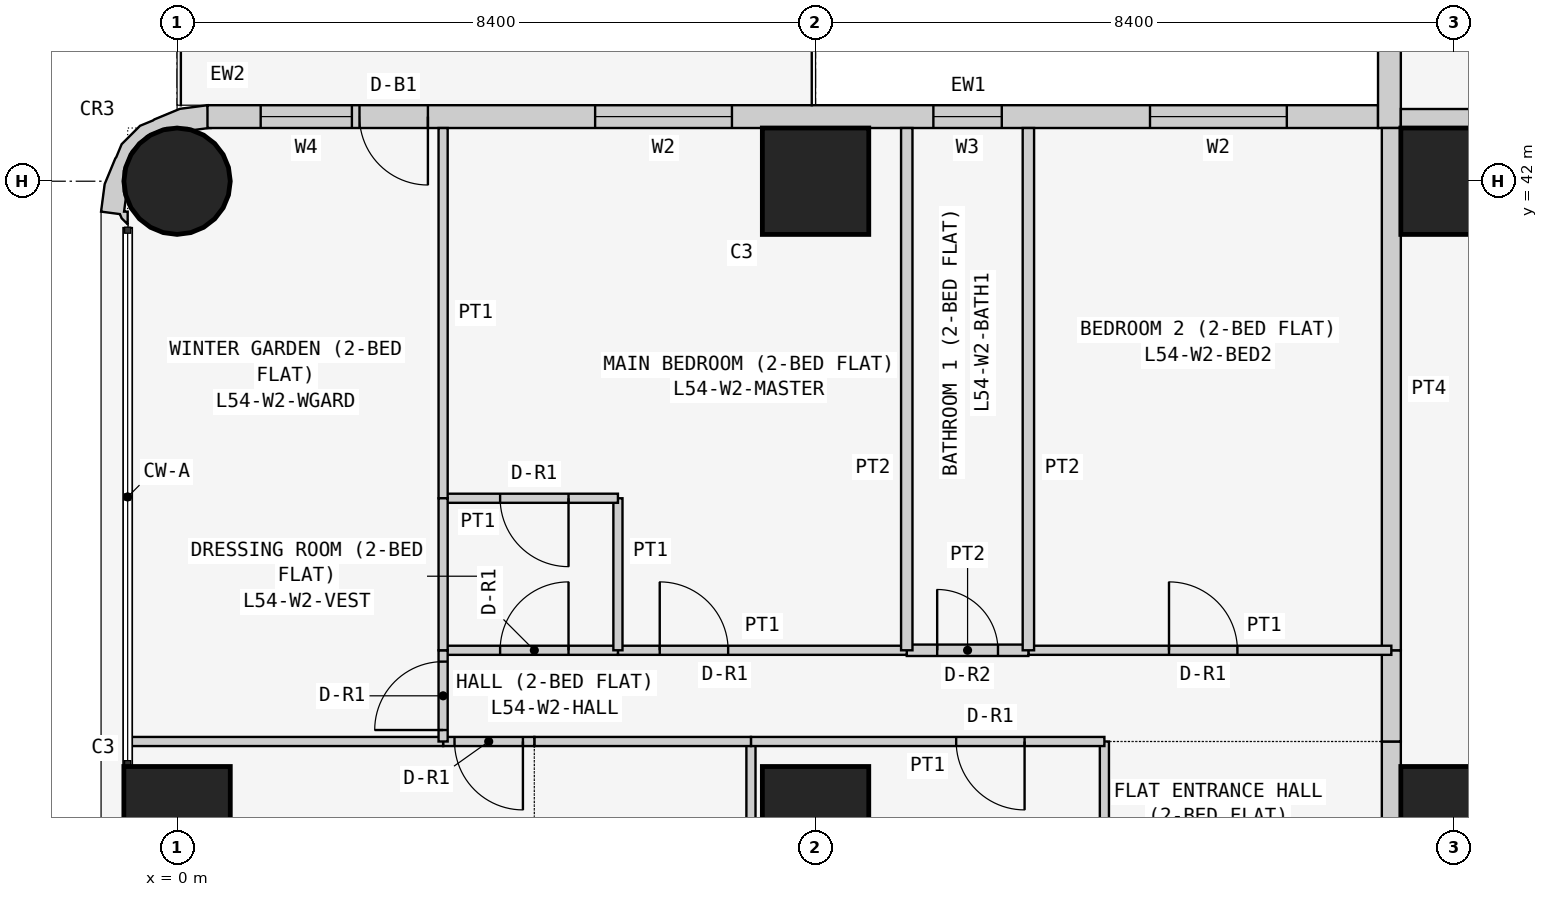
"""IFC4 building model, lengths in metres.
Left out: names, types, materials, properties, quantities, classifications, styles, units other than length and angle.
Written with IfcOpenShell. Run it as: python <this file> out.ifc"""

import sys

from ifc_helpers import new_model, si_unit, direction, frame, frame_2d, origin, origin_2d, place, context, subcontext, project, spatial, polyline, rectangle, circle, outline, extrude, element, fill, save


model = new_model("IFC4")
c1 = context("Model", 3, precision=1e-05, world=origin(), true_north=direction((0.0, 1.0)))
c2 = subcontext(c1, "Body", "Model", "MODEL_VIEW")
j1 = project(units=[si_unit("LENGTHUNIT", "METRE"), si_unit("PLANEANGLEUNIT", "RADIAN")], contexts=[c1])
p1 = place(None, origin())
s1 = spatial("IfcSite", under=j1, at=p1, CompositionType="ELEMENT")
p2 = place(p1, origin())
s2 = spatial("IfcBuilding", under=s1, at=p2, CompositionType="ELEMENT")
p3 = place(p2, frame((0.0, 0.0, 208.5)))
s3 = spatial("IfcBuildingStorey", under=s2, at=p3, CompositionType="ELEMENT", Elevation=208.5)
p4 = place(p3, frame((0.0, 33.6, 0.0), z_axis=(0.0, 0.0, 1.0), x_axis=(1.0, 0.0, 0.0)))
e1 = element("IfcColumn", 1, at=p4, inside=s3, PredefinedType="COLUMN", context=c2, shape_type="SweptSolid", body=[
    extrude(rectangle(XDim=1.4, YDim=1.4, at=origin_2d()), origin(), (0.0, 0.0, 1.0), 3.6),
])
p5 = place(p3, frame((0.0, 42.0, 0.0), z_axis=(0.0, 0.0, 1.0), x_axis=(1.0, 0.0, 0.0)))
e2 = element("IfcColumn", 2, at=p5, inside=s3, PredefinedType="COLUMN", context=c2, shape_type="SweptSolid", body=[
    extrude(circle(Radius=0.7, at=origin_2d()), origin(), (0.0, 0.0, 1.0), 3.6),
])
for number, where, z_axis, x_axis in (
    (3, (8.4, 33.6, 0.0), (0.0, 0.0, 1.0), (1.0, 0.0, 0.0)),
    (4, (8.4, 42.0, 0.0), (0.0, 0.0, 1.0), (1.0, 0.0, 0.0)),
    (5, (16.8, 33.6, 0.0), (0.0, 0.0, 1.0), (1.0, 0.0, 0.0)),
    (6, (16.8, 42.0, 0.0), (0.0, 0.0, 1.0), (1.0, 0.0, 0.0)),
):
    element("IfcColumn", number, at=place(p3, frame(where, z_axis=z_axis, x_axis=x_axis)), inside=s3, PredefinedType="COLUMN", context=c2, shape_type="SweptSolid", body=[
        extrude(rectangle(XDim=1.4, YDim=1.4, at=origin_2d()), origin(), (0.0, 0.0, 1.0), 3.6),
    ])
p6 = place(p3, frame((15.8, 42.85, 0.0), z_axis=(0.0, 0.0, 1.0), x_axis=(-1.0, 0.0, 0.0)))
e7 = element("IfcWall", 7, at=p6, inside=s3, PredefinedType="SOLIDWALL", context=c2, shape_type="SweptSolid", body=[
    extrude(rectangle(XDim=15.4, YDim=0.3, at=frame_2d((7.7, 0.0))), origin(), (0.0, 0.0, 1.0), 3.45),
])
p7 = place(p6, frame((1.2, 0.0, 0.9)))
e8 = element("IfcOpeningElement", 8, at=p7, cuts=e7, PredefinedType="OPENING", context=c2, shape_type="SweptSolid", body=[
    extrude(rectangle(XDim=1.8, YDim=1.5, at=frame_2d((0.9, 0.75))), frame((0.0, 0.16, 0.0), z_axis=(0.0, -1.0, 0.0), x_axis=(1.0, 0.0, 0.0)), (0.0, 0.0, 1.0), 0.32),
])
p8 = place(p6, frame((4.95, 0.0, 1.5)))
e9 = element("IfcOpeningElement", 9, at=p8, cuts=e7, PredefinedType="OPENING", context=c2, shape_type="SweptSolid", body=[
    extrude(rectangle(XDim=0.9, YDim=0.7, at=frame_2d((0.45, 0.35))), frame((0.0, 0.16, 0.0), z_axis=(0.0, -1.0, 0.0), x_axis=(1.0, 0.0, 0.0)), (0.0, 0.0, 1.0), 0.32),
])
p9 = place(p6, frame((8.5, 0.0, 0.9)))
e10 = element("IfcOpeningElement", 10, at=p9, cuts=e7, PredefinedType="OPENING", context=c2, shape_type="SweptSolid", body=[
    extrude(rectangle(XDim=1.8, YDim=1.5, at=frame_2d((0.9, 0.75))), frame((0.0, 0.16, 0.0), z_axis=(0.0, -1.0, 0.0), x_axis=(1.0, 0.0, 0.0)), (0.0, 0.0, 1.0), 0.32),
])
p10 = place(p6, frame((12.5, 0.0, 0.0)))
e11 = element("IfcOpeningElement", 11, at=p10, cuts=e7, PredefinedType="OPENING", context=c2, shape_type="SweptSolid", body=[
    extrude(rectangle(XDim=0.9, YDim=2.4, at=frame_2d((0.45, 1.2))), frame((0.0, 0.16, 0.0), z_axis=(0.0, -1.0, 0.0), x_axis=(1.0, 0.0, 0.0)), (0.0, 0.0, 1.0), 0.32),
])
p11 = place(p6, frame((13.5, 0.0, 0.9)))
e12 = element("IfcOpeningElement", 12, at=p11, cuts=e7, PredefinedType="OPENING", context=c2, shape_type="SweptSolid", body=[
    extrude(rectangle(XDim=1.2, YDim=1.5, at=frame_2d((0.6, 0.75))), frame((0.0, 0.16, 0.0), z_axis=(0.0, -1.0, 0.0), x_axis=(1.0, 0.0, 0.0)), (0.0, 0.0, 1.0), 0.32),
])
p12 = place(p3, frame((15.95, 50.0, 0.0), z_axis=(0.0, 0.0, 1.0), x_axis=(0.0, -1.0, 0.0)))
e13 = element("IfcWall", 13, at=p12, inside=s3, PredefinedType="SOLIDWALL", context=c2, shape_type="SweptSolid", body=[
    extrude(rectangle(XDim=7.3, YDim=0.3, at=frame_2d((3.65, 0.0))), origin(), (0.0, 0.0, 1.0), 3.45),
])
p13 = place(p12, frame((3.1, 0.0, 0.9)))
e14 = element("IfcOpeningElement", 14, at=p13, cuts=e13, PredefinedType="OPENING", context=c2, shape_type="SweptSolid", body=[
    extrude(rectangle(XDim=2.4, YDim=1.5, at=frame_2d((1.2, 0.75))), frame((0.0, 0.16, 0.0), z_axis=(0.0, -1.0, 0.0), x_axis=(1.0, 0.0, 0.0)), (0.0, 0.0, 1.0), 0.32),
])
p14 = place(p12, frame((0.75, 0.0, 0.9)))
e15 = element("IfcOpeningElement", 15, at=p14, cuts=e13, PredefinedType="OPENING", context=c2, shape_type="SweptSolid", body=[
    extrude(rectangle(XDim=1.2, YDim=1.5, at=frame_2d((0.6, 0.75))), frame((0.0, 0.16, 0.0), z_axis=(0.0, -1.0, 0.0), x_axis=(1.0, 0.0, 0.0)), (0.0, 0.0, 1.0), 0.32),
])
p15 = place(p3, frame((0.29, 42.724, 0.0), z_axis=(0.0, 0.0, 1.0), x_axis=(-0.898030234854, 0.439933741929, 0.0)))
e16 = element("IfcWall", 16, at=p15, inside=s3, PredefinedType="SOLIDWALL", context=c2, shape_type="SweptSolid", body=[
    extrude(outline(polyline([(-0.145, -0.044), (0.022, -0.296), (0.327, -0.094), (0.568, 0.18), (0.578, 0.199), (0.7, 0.338), (0.811, 0.661), (0.799, 0.846), (0.803, 0.866), (0.78, 1.231), (0.664, 1.577), (0.426, 1.497), (0.382, 1.536), (0.276, 1.572), (0.349, 1.423), (0.392, 1.444), (0.453, 1.261), (0.51, 1.211), (0.632, 0.961), (0.65, 0.683), (0.56, 0.419), (0.375, 0.21), (0.125, 0.087), (0.05, 0.082), (-0.127, -0.035), (-0.145, -0.044)])), origin(), (0.0, 0.0, 1.0), 3.45),
])
p16 = place(p3, frame((16.1, 42.825, 0.0), z_axis=(0.0, 0.0, 1.0), x_axis=(1.0, 0.0, 0.0)))
e17 = element("IfcWall", 17, at=p16, inside=s3, PredefinedType="PARTITIONING", context=c2, shape_type="SweptSolid", body=[
    extrude(rectangle(XDim=6.871, YDim=0.25, at=frame_2d((3.436, 0.0))), origin(), (0.0, 0.0, 1.0), 3.45),
])
p17 = place(p3, frame((15.975, 29.4, 0.0), z_axis=(0.0, 0.0, 1.0), x_axis=(0.0, 1.0, 0.0)))
e18 = element("IfcWall", 18, at=p17, inside=s3, PredefinedType="PARTITIONING", context=c2, shape_type="SweptSolid", body=[
    extrude(rectangle(XDim=5.229, YDim=0.25, at=frame_2d((2.615, 0.0))), origin(), (0.0, 0.0, 1.0), 3.45),
])
p18 = place(p17, frame((2.1, 0.0, 0.0)))
e19 = element("IfcOpeningElement", 19, at=p18, cuts=e18, PredefinedType="OPENING", context=c2, shape_type="SweptSolid", body=[
    extrude(rectangle(XDim=1.0, YDim=2.1, at=frame_2d((0.5, 1.05))), frame((0.0, 0.135, 0.0), z_axis=(0.0, -1.0, 0.0), x_axis=(1.0, 0.0, 0.0)), (0.0, 0.0, 1.0), 0.27),
])
p19 = place(p3, frame((15.975, 34.629, 0.0), z_axis=(0.0, 0.0, 1.0), x_axis=(0.0, 1.0, 0.0)))
e20 = element("IfcWall", 20, at=p19, inside=s3, PredefinedType="PARTITIONING", context=c2, shape_type="SweptSolid", body=[
    extrude(rectangle(XDim=1.2, YDim=0.25, at=frame_2d((0.6, 0.0))), origin(), (0.0, 0.0, 1.0), 3.45),
])
p20 = place(p3, frame((15.975, 35.829, 0.0), z_axis=(0.0, 0.0, 1.0), x_axis=(0.0, 1.0, 0.0)))
e21 = element("IfcWall", 21, at=p20, inside=s3, PredefinedType="PARTITIONING", context=c2, shape_type="SweptSolid", body=[
    extrude(rectangle(XDim=6.871, YDim=0.25, at=frame_2d((3.436, 0.0))), origin(), (0.0, 0.0, 1.0), 3.45),
])
for number, where, z_axis, x_axis in (
    (22, (12.2, 29.4, 0.0), (0.0, 0.0, 1.0), (0.0, 1.0, 0.0)),
    (23, (7.55, 29.4, 0.0), (0.0, 0.0, 1.0), (0.0, 1.0, 0.0)),
):
    element("IfcWall", number, at=place(p3, frame(where, z_axis=z_axis, x_axis=x_axis)), inside=s3, PredefinedType="PARTITIONING", context=c2, shape_type="SweptSolid", body=[
        extrude(rectangle(XDim=5.229, YDim=0.12, at=frame_2d((2.615, 0.0))), origin(), (0.0, 0.0, 1.0), 3.45),
    ])
p21 = place(p3, frame((7.55, 34.629, 0.0), z_axis=(0.0, 0.0, 1.0), x_axis=(1.0, 0.0, 0.0)))
e24 = element("IfcWall", 24, at=p21, inside=s3, PredefinedType="PARTITIONING", context=c2, shape_type="SweptSolid", body=[
    extrude(rectangle(XDim=4.65, YDim=0.12, at=frame_2d((2.325, 0.0))), origin(), (0.0, 0.0, 1.0), 3.45),
])
p22 = place(p21, frame((2.7, 0.0, 0.0)))
e25 = element("IfcOpeningElement", 25, at=p22, cuts=e24, PredefinedType="OPENING", context=c2, shape_type="SweptSolid", body=[
    extrude(rectangle(XDim=0.9, YDim=2.1, at=frame_2d((0.45, 1.05))), frame((0.0, 0.07, 0.0), z_axis=(0.0, -1.0, 0.0), x_axis=(1.0, 0.0, 0.0)), (0.0, 0.0, 1.0), 0.14),
])
p23 = place(p3, frame((4.7, 34.629, 0.0), z_axis=(0.0, 0.0, 1.0), x_axis=(1.0, 0.0, 0.0)))
e26 = element("IfcWall", 26, at=p23, inside=s3, PredefinedType="PARTITIONING", context=c2, shape_type="SweptSolid", body=[
    extrude(rectangle(XDim=2.85, YDim=0.12, at=frame_2d((1.425, 0.0))), origin(), (0.0, 0.0, 1.0), 3.45),
])
p24 = place(p3, frame((3.5, 34.629, 0.0), z_axis=(0.0, 0.0, 1.0), x_axis=(1.0, 0.0, 0.0)))
e27 = element("IfcWall", 27, at=p24, inside=s3, PredefinedType="PARTITIONING", context=c2, shape_type="SweptSolid", body=[
    extrude(rectangle(XDim=1.2, YDim=0.12, at=frame_2d((0.6, 0.0))), origin(), (0.0, 0.0, 1.0), 3.45),
])
p25 = place(p24, frame((0.15, 0.0, 0.0)))
e28 = element("IfcOpeningElement", 28, at=p25, cuts=e27, PredefinedType="OPENING", context=c2, shape_type="SweptSolid", body=[
    extrude(rectangle(XDim=0.9, YDim=2.1, at=frame_2d((0.45, 1.05))), frame((0.0, 0.07, 0.0), z_axis=(0.0, -1.0, 0.0), x_axis=(1.0, 0.0, 0.0)), (0.0, 0.0, 1.0), 0.14),
])
p26 = place(p3, frame((-0.65, 34.629, 0.0), z_axis=(0.0, 0.0, 1.0), x_axis=(1.0, 0.0, 0.0)))
e29 = element("IfcWall", 29, at=p26, inside=s3, PredefinedType="PARTITIONING", context=c2, shape_type="SweptSolid", body=[
    extrude(rectangle(XDim=4.15, YDim=0.12, at=frame_2d((2.075, 0.0))), origin(), (0.0, 0.0, 1.0), 3.45),
])
p27 = place(p3, frame((11.2, 35.829, 0.0), z_axis=(0.0, 0.0, 1.0), x_axis=(1.0, 0.0, 0.0)))
e30 = element("IfcWall", 30, at=p27, inside=s3, PredefinedType="PARTITIONING", context=c2, shape_type="SweptSolid", body=[
    extrude(rectangle(XDim=4.775, YDim=0.12, at=frame_2d((2.388, 0.0))), origin(), (0.0, 0.0, 1.0), 3.45),
])
p28 = place(p27, frame((1.85, 0.0, 0.0)))
e31 = element("IfcOpeningElement", 31, at=p28, cuts=e30, PredefinedType="OPENING", context=c2, shape_type="SweptSolid", body=[
    extrude(rectangle(XDim=0.9, YDim=2.1, at=frame_2d((0.45, 1.05))), frame((0.0, 0.07, 0.0), z_axis=(0.0, -1.0, 0.0), x_axis=(1.0, 0.0, 0.0)), (0.0, 0.0, 1.0), 0.14),
])
p29 = place(p3, frame((9.6, 35.829, 0.0), z_axis=(0.0, 0.0, 1.0), x_axis=(1.0, 0.0, 0.0)))
e32 = element("IfcWall", 32, at=p29, inside=s3, PredefinedType="PARTITIONING", context=c2, shape_type="SweptSolid", body=[
    extrude(rectangle(XDim=1.6, YDim=0.15, at=frame_2d((0.8, 0.0))), origin(), (0.0, 0.0, 1.0), 3.45),
])
p30 = place(p29, frame((0.4, 0.0, 0.0)))
e33 = element("IfcOpeningElement", 33, at=p30, cuts=e32, PredefinedType="OPENING", context=c2, shape_type="SweptSolid", body=[
    extrude(rectangle(XDim=0.8, YDim=2.1, at=frame_2d((0.4, 1.05))), frame((0.0, 0.085, 0.0), z_axis=(0.0, -1.0, 0.0), x_axis=(1.0, 0.0, 0.0)), (0.0, 0.0, 1.0), 0.17),
])
p31 = place(p3, frame((5.8, 35.829, 0.0), z_axis=(0.0, 0.0, 1.0), x_axis=(1.0, 0.0, 0.0)))
e34 = element("IfcWall", 34, at=p31, inside=s3, PredefinedType="PARTITIONING", context=c2, shape_type="SweptSolid", body=[
    extrude(rectangle(XDim=3.8, YDim=0.12, at=frame_2d((1.9, 0.0))), origin(), (0.0, 0.0, 1.0), 3.45),
])
p32 = place(p31, frame((0.55, 0.0, 0.0)))
e35 = element("IfcOpeningElement", 35, at=p32, cuts=e34, PredefinedType="OPENING", context=c2, shape_type="SweptSolid", body=[
    extrude(rectangle(XDim=0.9, YDim=2.1, at=frame_2d((0.45, 1.05))), frame((0.0, 0.07, 0.0), z_axis=(0.0, -1.0, 0.0), x_axis=(1.0, 0.0, 0.0)), (0.0, 0.0, 1.0), 0.14),
])
p33 = place(p3, frame((3.5, 35.829, 0.0), z_axis=(0.0, 0.0, 1.0), x_axis=(1.0, 0.0, 0.0)))
e36 = element("IfcWall", 36, at=p33, inside=s3, PredefinedType="PARTITIONING", context=c2, shape_type="SweptSolid", body=[
    extrude(rectangle(XDim=2.3, YDim=0.12, at=frame_2d((1.15, 0.0))), origin(), (0.0, 0.0, 1.0), 3.45),
])
p34 = place(p33, frame((0.75, 0.0, 0.0)))
e37 = element("IfcOpeningElement", 37, at=p34, cuts=e36, PredefinedType="OPENING", context=c2, shape_type="SweptSolid", body=[
    extrude(rectangle(XDim=0.9, YDim=2.1, at=frame_2d((0.45, 1.05))), frame((0.0, 0.07, 0.0), z_axis=(0.0, -1.0, 0.0), x_axis=(1.0, 0.0, 0.0)), (0.0, 0.0, 1.0), 0.14),
])
p35 = place(p3, frame((3.5, 34.629, 0.0), z_axis=(0.0, 0.0, 1.0), x_axis=(0.0, 1.0, 0.0)))
e38 = element("IfcWall", 38, at=p35, inside=s3, PredefinedType="PARTITIONING", context=c2, shape_type="SweptSolid", body=[
    extrude(rectangle(XDim=1.2, YDim=0.12, at=frame_2d((0.6, 0.0))), origin(), (0.0, 0.0, 1.0), 3.45),
])
p36 = place(p35, frame((0.151, 0.0, 0.0)))
e39 = element("IfcOpeningElement", 39, at=p36, cuts=e38, PredefinedType="OPENING", context=c2, shape_type="SweptSolid", body=[
    extrude(rectangle(XDim=0.9, YDim=2.1, at=frame_2d((0.45, 1.05))), frame((0.0, 0.07, 0.0), z_axis=(0.0, -1.0, 0.0), x_axis=(1.0, 0.0, 0.0)), (0.0, 0.0, 1.0), 0.14),
])
for number, where, z_axis, x_axis in (
    (40, (11.2, 35.829, 0.0), (0.0, 0.0, 1.0), (0.0, 1.0, 0.0)),
    (41, (9.6, 35.829, 0.0), (0.0, 0.0, 1.0), (0.0, 1.0, 0.0)),
):
    element("IfcWall", number, at=place(p3, frame(where, z_axis=z_axis, x_axis=x_axis)), inside=s3, PredefinedType="PARTITIONING", context=c2, shape_type="SweptSolid", body=[
        extrude(rectangle(XDim=6.871, YDim=0.15, at=frame_2d((3.436, 0.0))), origin(), (0.0, 0.0, 1.0), 3.45),
    ])
p37 = place(p3, frame((5.8, 35.829, 0.0), z_axis=(0.0, 0.0, 1.0), x_axis=(0.0, 1.0, 0.0)))
e42 = element("IfcWall", 42, at=p37, inside=s3, PredefinedType="PARTITIONING", context=c2, shape_type="SweptSolid", body=[
    extrude(rectangle(XDim=2.0, YDim=0.12, at=frame_2d((1.0, 0.0))), origin(), (0.0, 0.0, 1.0), 3.45),
])
p38 = place(p3, frame((5.8, 37.829, 0.0), z_axis=(0.0, 0.0, 1.0), x_axis=(-1.0, 0.0, 0.0)))
e43 = element("IfcWall", 43, at=p38, inside=s3, PredefinedType="PARTITIONING", context=c2, shape_type="SweptSolid", body=[
    extrude(rectangle(XDim=2.3, YDim=0.12, at=frame_2d((1.15, 0.0))), origin(), (0.0, 0.0, 1.0), 3.45),
])
p39 = place(p38, frame((0.65, 0.0, 0.0)))
e44 = element("IfcOpeningElement", 44, at=p39, cuts=e43, PredefinedType="OPENING", context=c2, shape_type="SweptSolid", body=[
    extrude(rectangle(XDim=0.9, YDim=2.1, at=frame_2d((0.45, 1.05))), frame((0.0, 0.07, 0.0), z_axis=(0.0, -1.0, 0.0), x_axis=(1.0, 0.0, 0.0)), (0.0, 0.0, 1.0), 0.14),
])
p40 = place(p3, frame((3.5, 37.829, 0.0), z_axis=(0.0, 0.0, 1.0), x_axis=(0.0, 1.0, 0.0)))
e45 = element("IfcWall", 45, at=p40, inside=s3, PredefinedType="PARTITIONING", context=c2, shape_type="SweptSolid", body=[
    extrude(rectangle(XDim=4.871, YDim=0.12, at=frame_2d((2.436, 0.0))), origin(), (0.0, 0.0, 1.0), 3.45),
])
p41 = place(p3, frame((3.5, 35.829, 0.0), z_axis=(0.0, 0.0, 1.0), x_axis=(0.0, 1.0, 0.0)))
e46 = element("IfcWall", 46, at=p41, inside=s3, PredefinedType="PARTITIONING", context=c2, shape_type="SweptSolid", body=[
    extrude(rectangle(XDim=2.0, YDim=0.12, at=frame_2d((1.0, 0.0))), origin(), (0.0, 0.0, 1.0), 3.45),
])
p42 = place(p7, origin())
e47 = element("IfcWindow", 47, at=p42, inside=s3, PartitioningType="SINGLE_PANEL", PredefinedType="WINDOW", context=c2, shape_type="SweptSolid", body=[
    extrude(rectangle(XDim=1.8, YDim=1.5, at=frame_2d((0.9, 0.75))), frame((0.0, 0.03, 0.0), z_axis=(0.0, -1.0, 0.0), x_axis=(1.0, 0.0, 0.0)), (0.0, 0.0, 1.0), 0.06),
])
fill(e8, e47)
p43 = place(p8, origin())
e48 = element("IfcWindow", 48, at=p43, inside=s3, PartitioningType="SINGLE_PANEL", PredefinedType="WINDOW", context=c2, shape_type="SweptSolid", body=[
    extrude(rectangle(XDim=0.9, YDim=0.7, at=frame_2d((0.45, 0.35))), frame((0.0, 0.03, 0.0), z_axis=(0.0, -1.0, 0.0), x_axis=(1.0, 0.0, 0.0)), (0.0, 0.0, 1.0), 0.06),
])
fill(e9, e48)
p44 = place(p9, origin())
e49 = element("IfcWindow", 49, at=p44, inside=s3, PartitioningType="SINGLE_PANEL", PredefinedType="WINDOW", context=c2, shape_type="SweptSolid", body=[
    extrude(rectangle(XDim=1.8, YDim=1.5, at=frame_2d((0.9, 0.75))), frame((0.0, 0.03, 0.0), z_axis=(0.0, -1.0, 0.0), x_axis=(1.0, 0.0, 0.0)), (0.0, 0.0, 1.0), 0.06),
])
fill(e10, e49)
p45 = place(p10, origin())
e50 = element("IfcDoor", 50, at=p45, inside=s3, OperationType="SINGLE_SWING_LEFT", PredefinedType="DOOR", context=c2, shape_type="SweptSolid", body=[
    extrude(rectangle(XDim=0.9, YDim=2.4, at=frame_2d((0.45, 1.2))), frame((0.0, 0.025, 0.0), z_axis=(0.0, -1.0, 0.0), x_axis=(1.0, 0.0, 0.0)), (0.0, 0.0, 1.0), 0.05),
])
fill(e11, e50)
p46 = place(p11, origin())
e51 = element("IfcWindow", 51, at=p46, inside=s3, PartitioningType="SINGLE_PANEL", PredefinedType="WINDOW", context=c2, shape_type="SweptSolid", body=[
    extrude(rectangle(XDim=1.2, YDim=1.5, at=frame_2d((0.6, 0.75))), frame((0.0, 0.03, 0.0), z_axis=(0.0, -1.0, 0.0), x_axis=(1.0, 0.0, 0.0)), (0.0, 0.0, 1.0), 0.06),
])
fill(e12, e51)
p47 = place(p22, frame((0.9, 0.0, 0.0), z_axis=(0.0, 0.0, 1.0), x_axis=(-1.0, 0.0, 0.0)))
e52 = element("IfcDoor", 52, at=p47, inside=s3, OperationType="SINGLE_SWING_LEFT", PredefinedType="DOOR", context=c2, shape_type="SweptSolid", body=[
    extrude(rectangle(XDim=0.9, YDim=2.1, at=frame_2d((0.45, 1.05))), frame((0.0, 0.025, 0.0), z_axis=(0.0, -1.0, 0.0), x_axis=(1.0, 0.0, 0.0)), (0.0, 0.0, 1.0), 0.05),
])
fill(e25, e52)
p48 = place(p25, frame((0.9, 0.0, 0.0), z_axis=(0.0, 0.0, 1.0), x_axis=(-1.0, 0.0, 0.0)))
e53 = element("IfcDoor", 53, at=p48, inside=s3, OperationType="SINGLE_SWING_LEFT", PredefinedType="DOOR", context=c2, shape_type="SweptSolid", body=[
    extrude(rectangle(XDim=0.9, YDim=2.1, at=frame_2d((0.45, 1.05))), frame((0.0, 0.025, 0.0), z_axis=(0.0, -1.0, 0.0), x_axis=(1.0, 0.0, 0.0)), (0.0, 0.0, 1.0), 0.05),
])
fill(e28, e53)
p49 = place(p28, origin())
e54 = element("IfcDoor", 54, at=p49, inside=s3, OperationType="SINGLE_SWING_LEFT", PredefinedType="DOOR", context=c2, shape_type="SweptSolid", body=[
    extrude(rectangle(XDim=0.9, YDim=2.1, at=frame_2d((0.45, 1.05))), frame((0.0, 0.025, 0.0), z_axis=(0.0, -1.0, 0.0), x_axis=(1.0, 0.0, 0.0)), (0.0, 0.0, 1.0), 0.05),
])
fill(e31, e54)
p50 = place(p30, origin())
e55 = element("IfcDoor", 55, at=p50, inside=s3, OperationType="SINGLE_SWING_LEFT", PredefinedType="DOOR", context=c2, shape_type="SweptSolid", body=[
    extrude(rectangle(XDim=0.8, YDim=2.1, at=frame_2d((0.4, 1.05))), frame((0.0, 0.025, 0.0), z_axis=(0.0, -1.0, 0.0), x_axis=(1.0, 0.0, 0.0)), (0.0, 0.0, 1.0), 0.05),
])
fill(e33, e55)
p51 = place(p32, origin())
e56 = element("IfcDoor", 56, at=p51, inside=s3, OperationType="SINGLE_SWING_LEFT", PredefinedType="DOOR", context=c2, shape_type="SweptSolid", body=[
    extrude(rectangle(XDim=0.9, YDim=2.1, at=frame_2d((0.45, 1.05))), frame((0.0, 0.025, 0.0), z_axis=(0.0, -1.0, 0.0), x_axis=(1.0, 0.0, 0.0)), (0.0, 0.0, 1.0), 0.05),
])
fill(e35, e56)
p52 = place(p34, origin())
e57 = element("IfcDoor", 57, at=p52, inside=s3, OperationType="SINGLE_SWING_RIGHT", PredefinedType="DOOR", context=c2, shape_type="SweptSolid", body=[
    extrude(rectangle(XDim=0.9, YDim=2.1, at=frame_2d((0.45, 1.05))), frame((0.0, 0.025, 0.0), z_axis=(0.0, -1.0, 0.0), x_axis=(1.0, 0.0, 0.0)), (0.0, 0.0, 1.0), 0.05),
])
fill(e37, e57)
p53 = place(p39, origin())
e58 = element("IfcDoor", 58, at=p53, inside=s3, OperationType="SINGLE_SWING_LEFT", PredefinedType="DOOR", context=c2, shape_type="SweptSolid", body=[
    extrude(rectangle(XDim=0.9, YDim=2.1, at=frame_2d((0.45, 1.05))), frame((0.0, 0.025, 0.0), z_axis=(0.0, -1.0, 0.0), x_axis=(1.0, 0.0, 0.0)), (0.0, 0.0, 1.0), 0.05),
])
fill(e44, e58)
p54 = place(p36, origin())
e59 = element("IfcDoor", 59, at=p54, inside=s3, OperationType="SINGLE_SWING_LEFT", PredefinedType="DOOR", context=c2, shape_type="SweptSolid", body=[
    extrude(rectangle(XDim=0.9, YDim=2.1, at=frame_2d((0.45, 1.05))), frame((0.0, 0.025, 0.0), z_axis=(0.0, -1.0, 0.0), x_axis=(1.0, 0.0, 0.0)), (0.0, 0.0, 1.0), 0.05),
])
fill(e39, e59)
save(model, sys.argv[1])
